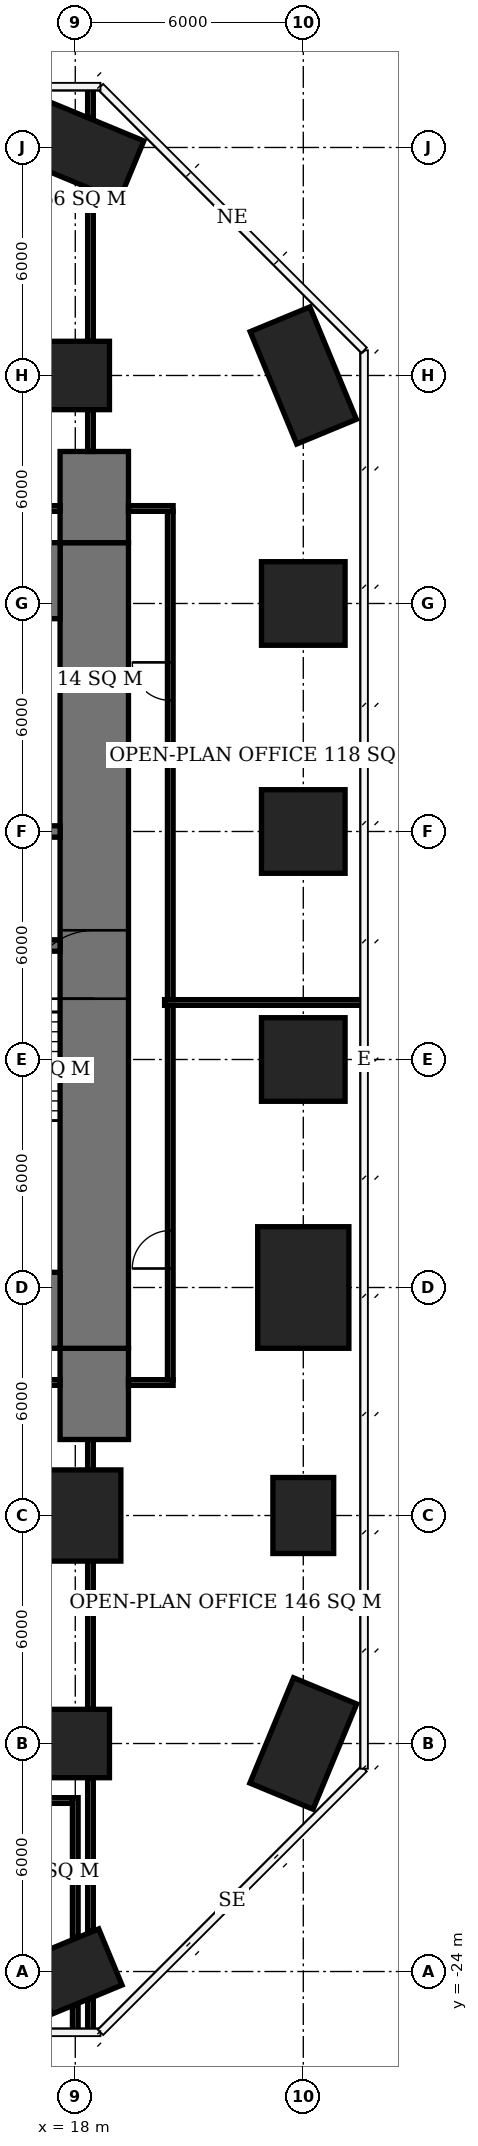
"""IFC4 building model, lengths in metres.
Left out: names, types, materials, properties, quantities, classifications, styles, units other than length and angle.
Written with IfcOpenShell. Run it as: python <this file> out.ifc"""

import sys

from ifc_helpers import new_model, si_unit, direction, frame, frame_2d, origin, origin_2d, place, context, subcontext, project, spatial, rectangle, extrude, element, fill, save


model = new_model("IFC4")
c1 = context("Model", 3, precision=1e-05, world=origin(), true_north=direction((0.0, 1.0)))
c2 = subcontext(c1, "Body", "Model", "MODEL_VIEW")
j1 = project(units=[si_unit("LENGTHUNIT", "METRE"), si_unit("PLANEANGLEUNIT", "RADIAN")], contexts=[c1])
p1 = place(None, origin())
s1 = spatial("IfcSite", under=j1, at=p1, CompositionType="ELEMENT")
p2 = place(p1, origin())
s2 = spatial("IfcBuilding", under=s1, at=p2, CompositionType="ELEMENT")
p3 = place(p2, frame((0.0, 0.0, 37.7)))
s3 = spatial("IfcBuildingStorey", under=s2, at=p3, CompositionType="ELEMENT", Elevation=37.7)
p4 = place(p3, frame((18.0, -24.0, 0.0), z_axis=(0.0, 0.0, 1.0), x_axis=(-0.923879532511, -0.382683432365, 0.0)))
e1 = element("IfcColumn", 1, at=p4, inside=s3, PredefinedType="COLUMN", context=c2, shape_type="SweptSolid", body=[
    extrude(rectangle(XDim=2.0, YDim=1.6, at=origin_2d()), origin(), (0.0, 0.0, 1.0), 3.9),
])
p5 = place(p3, frame((18.0, -18.0, 0.0), z_axis=(0.0, 0.0, 1.0), x_axis=(1.0, 0.0, 0.0)))
e2 = element("IfcColumn", 2, at=p5, inside=s3, PredefinedType="COLUMN", context=c2, shape_type="SweptSolid", body=[
    extrude(rectangle(XDim=1.8, YDim=1.8, at=origin_2d()), origin(), (0.0, 0.0, 1.0), 3.9),
])
p6 = place(p3, frame((18.0, -12.0, 0.0), z_axis=(0.0, 0.0, 1.0), x_axis=(1.0, 0.0, 0.0)))
e3 = element("IfcColumn", 3, at=p6, inside=s3, PredefinedType="COLUMN", context=c2, shape_type="SweptSolid", body=[
    extrude(rectangle(XDim=2.4, YDim=2.4, at=origin_2d()), origin(), (0.0, 0.0, 1.0), 3.9),
])
p7 = place(p3, frame((18.0, 18.0, 0.0), z_axis=(0.0, 0.0, 1.0), x_axis=(1.0, 0.0, 0.0)))
e4 = element("IfcColumn", 4, at=p7, inside=s3, PredefinedType="COLUMN", context=c2, shape_type="SweptSolid", body=[
    extrude(rectangle(XDim=1.8, YDim=1.8, at=origin_2d()), origin(), (0.0, 0.0, 1.0), 3.9),
])
p8 = place(p3, frame((18.0, 24.0, 0.0), z_axis=(0.0, 0.0, 1.0), x_axis=(0.923879532511, -0.382683432365, 0.0)))
e5 = element("IfcColumn", 5, at=p8, inside=s3, PredefinedType="COLUMN", context=c2, shape_type="SweptSolid", body=[
    extrude(rectangle(XDim=3.2, YDim=1.7, at=origin_2d()), origin(), (0.0, 0.0, 1.0), 3.9),
])
p9 = place(p3, frame((24.0, -18.0, 0.0), z_axis=(0.0, 0.0, 1.0), x_axis=(-0.382683432365, -0.923879532511, 0.0)))
e6 = element("IfcColumn", 6, at=p9, inside=s3, PredefinedType="COLUMN", context=c2, shape_type="SweptSolid", body=[
    extrude(rectangle(XDim=3.0, YDim=1.8, at=origin_2d()), origin(), (0.0, 0.0, 1.0), 3.9),
])
p10 = place(p3, frame((24.0, -12.0, 0.0), z_axis=(0.0, 0.0, 1.0), x_axis=(0.0, 1.0, 0.0)))
e7 = element("IfcColumn", 7, at=p10, inside=s3, PredefinedType="COLUMN", context=c2, shape_type="SweptSolid", body=[
    extrude(rectangle(XDim=2.0, YDim=1.6, at=origin_2d()), origin(), (0.0, 0.0, 1.0), 3.9),
])
p11 = place(p3, frame((24.0, -6.0, 0.0), z_axis=(0.0, 0.0, 1.0), x_axis=(0.0, 1.0, 0.0)))
e8 = element("IfcColumn", 8, at=p11, inside=s3, PredefinedType="COLUMN", context=c2, shape_type="SweptSolid", body=[
    extrude(rectangle(XDim=3.2, YDim=2.4, at=origin_2d()), origin(), (0.0, 0.0, 1.0), 3.9),
])
for number, where, z_axis, x_axis in (
    (9, (24.0, 0.0, 0.0), (0.0, 0.0, 1.0), (1.0, 0.0, 0.0)),
    (10, (24.0, 6.0, 0.0), (0.0, 0.0, 1.0), (1.0, 0.0, 0.0)),
    (11, (24.0, 12.0, 0.0), (0.0, 0.0, 1.0), (1.0, 0.0, 0.0)),
):
    element("IfcColumn", number, at=place(p3, frame(where, z_axis=z_axis, x_axis=x_axis)), inside=s3, PredefinedType="COLUMN", context=c2, shape_type="SweptSolid", body=[
        extrude(rectangle(XDim=2.2, YDim=2.2, at=origin_2d()), origin(), (0.0, 0.0, 1.0), 3.9),
    ])
p12 = place(p3, frame((24.0, 18.0, 0.0), z_axis=(0.0, 0.0, 1.0), x_axis=(0.382683432365, -0.923879532511, 0.0)))
e12 = element("IfcColumn", 12, at=p12, inside=s3, PredefinedType="COLUMN", context=c2, shape_type="SweptSolid", body=[
    extrude(rectangle(XDim=3.2, YDim=1.7, at=origin_2d()), origin(), (0.0, 0.0, 1.0), 3.9),
])
for number, where, z_axis, x_axis in (
    (13, (-5.6, -6.6, 0.0), (0.0, 0.0, 1.0), (1.0, 0.0, 0.0)),
    (14, (-5.6, 12.6, 0.0), (0.0, 0.0, 1.0), (1.0, 0.0, 0.0)),
):
    element("IfcWall", number, at=place(p3, frame(where, z_axis=z_axis, x_axis=x_axis)), inside=s3, PredefinedType="SHEAR", context=c2, shape_type="SweptSolid", body=[
        extrude(rectangle(XDim=23.2, YDim=2.0, at=frame_2d((11.6, 0.0))), origin(), (0.0, 0.0, 1.0), 3.9),
    ])
p13 = place(p3, frame((18.5, -7.6, 0.0), z_axis=(0.0, 0.0, 1.0), x_axis=(0.0, 1.0, 0.0)))
e15 = element("IfcWall", 15, at=p13, inside=s3, PredefinedType="SHEAR", context=c2, shape_type="SweptSolid", body=[
    extrude(rectangle(XDim=21.2, YDim=1.8, at=frame_2d((10.6, 0.0))), origin(), (0.0, 0.0, 1.0), 3.9),
])
p14 = place(p13, frame((9.2, 0.0, 0.0)))
e16 = element("IfcOpeningElement", 16, at=p14, cuts=e15, PredefinedType="OPENING", context=c2, shape_type="SweptSolid", body=[
    extrude(rectangle(XDim=1.8, YDim=2.4, at=frame_2d((0.9, 1.2))), frame((0.0, 0.91, 0.0), z_axis=(0.0, -1.0, 0.0), x_axis=(1.0, 0.0, 0.0)), (0.0, 0.0, 1.0), 1.82),
])
for number, where, z_axis, x_axis in (
    (17, (18.5, -10.0, 0.0), (0.0, 0.0, 1.0), (0.0, 1.0, 0.0)),
    (18, (18.5, 13.6, 0.0), (0.0, 0.0, 1.0), (0.0, 1.0, 0.0)),
):
    element("IfcWall", number, at=place(p3, frame(where, z_axis=z_axis, x_axis=x_axis)), inside=s3, PredefinedType="SHEAR", context=c2, shape_type="SweptSolid", body=[
        extrude(rectangle(XDim=2.4, YDim=1.8, at=frame_2d((1.2, 0.0))), origin(), (0.0, 0.0, 1.0), 3.9),
    ])
p15 = place(p3, frame((12.15, 3.0, 0.0), z_axis=(0.0, 0.0, 1.0), x_axis=(1.0, 0.0, 0.0)))
e19 = element("IfcWall", 19, at=p15, inside=s3, PredefinedType="SHEAR", context=c2, shape_type="SweptSolid", body=[
    extrude(rectangle(XDim=5.45, YDim=0.3, at=frame_2d((2.725, 0.0))), origin(), (0.0, 0.0, 1.0), 3.9),
])
p16 = place(p15, frame((3.25, 0.0, 0.0)))
e20 = element("IfcOpeningElement", 20, at=p16, cuts=e19, PredefinedType="OPENING", context=c2, shape_type="SweptSolid", body=[
    extrude(rectangle(XDim=1.2, YDim=2.1, at=frame_2d((0.6, 1.05))), frame((0.0, 0.16, 0.0), z_axis=(0.0, -1.0, 0.0), x_axis=(1.0, 0.0, 0.0)), (0.0, 0.0, 1.0), 0.32),
])
p17 = place(p15, frame((0.45, 0.0, 0.0)))
e21 = element("IfcOpeningElement", 21, at=p17, cuts=e19, PredefinedType="OPENING", context=c2, shape_type="SweptSolid", body=[
    extrude(rectangle(XDim=0.9, YDim=2.1, at=frame_2d((0.45, 1.05))), frame((0.0, 0.16, 0.0), z_axis=(0.0, -1.0, 0.0), x_axis=(1.0, 0.0, 0.0)), (0.0, 0.0, 1.0), 0.32),
])
p18 = place(p3, frame((-0.15, 6.0, 0.0), z_axis=(0.0, 0.0, 1.0), x_axis=(1.0, 0.0, 0.0)))
e22 = element("IfcWall", 22, at=p18, inside=s3, PredefinedType="SHEAR", context=c2, shape_type="SweptSolid", body=[
    extrude(rectangle(XDim=17.75, YDim=0.3, at=frame_2d((8.875, 0.0))), origin(), (0.0, 0.0, 1.0), 3.9),
])
p19 = place(p18, frame((13.15, 0.0, 0.0)))
e23 = element("IfcOpeningElement", 23, at=p19, cuts=e22, PredefinedType="OPENING", context=c2, shape_type="SweptSolid", body=[
    extrude(rectangle(XDim=0.9, YDim=2.1, at=frame_2d((0.45, 1.05))), frame((0.0, 0.16, 0.0), z_axis=(0.0, -1.0, 0.0), x_axis=(1.0, 0.0, 0.0)), (0.0, 0.0, 1.0), 0.32),
])
p20 = place(p18, frame((16.25, 0.0, 0.0)))
e24 = element("IfcOpeningElement", 24, at=p20, cuts=e22, PredefinedType="OPENING", context=c2, shape_type="SweptSolid", body=[
    extrude(rectangle(XDim=1.0, YDim=2.1, at=frame_2d((0.5, 1.05))), frame((0.0, 0.16, 0.0), z_axis=(0.0, -1.0, 0.0), x_axis=(1.0, 0.0, 0.0)), (0.0, 0.0, 1.0), 0.32),
])
p21 = place(p18, frame((1.1, 0.0, 0.0)))
e25 = element("IfcOpeningElement", 25, at=p21, cuts=e22, PredefinedType="OPENING", context=c2, shape_type="SweptSolid", body=[
    extrude(rectangle(XDim=1.1, YDim=2.1, at=frame_2d((0.55, 1.05))), frame((0.0, 0.16, 0.0), z_axis=(0.0, -1.0, 0.0), x_axis=(1.0, 0.0, 0.0)), (0.0, 0.0, 1.0), 0.32),
])
p22 = place(p18, frame((4.1, 0.0, 0.0)))
e26 = element("IfcOpeningElement", 26, at=p22, cuts=e22, PredefinedType="OPENING", context=c2, shape_type="SweptSolid", body=[
    extrude(rectangle(XDim=1.1, YDim=2.1, at=frame_2d((0.55, 1.05))), frame((0.0, 0.16, 0.0), z_axis=(0.0, -1.0, 0.0), x_axis=(1.0, 0.0, 0.0)), (0.0, 0.0, 1.0), 0.32),
])
p23 = place(p18, frame((7.1, 0.0, 0.0)))
e27 = element("IfcOpeningElement", 27, at=p23, cuts=e22, PredefinedType="OPENING", context=c2, shape_type="SweptSolid", body=[
    extrude(rectangle(XDim=1.1, YDim=2.1, at=frame_2d((0.55, 1.05))), frame((0.0, 0.16, 0.0), z_axis=(0.0, -1.0, 0.0), x_axis=(1.0, 0.0, 0.0)), (0.0, 0.0, 1.0), 0.32),
])
p24 = place(p18, frame((10.1, 0.0, 0.0)))
e28 = element("IfcOpeningElement", 28, at=p24, cuts=e22, PredefinedType="OPENING", context=c2, shape_type="SweptSolid", body=[
    extrude(rectangle(XDim=1.1, YDim=2.1, at=frame_2d((0.55, 1.05))), frame((0.0, 0.16, 0.0), z_axis=(0.0, -1.0, 0.0), x_axis=(1.0, 0.0, 0.0)), (0.0, 0.0, 1.0), 0.32),
])
p25 = place(p3, frame((12.075, -19.5, 0.0), z_axis=(0.0, 0.0, 1.0), x_axis=(1.0, 0.0, 0.0)))
e29 = element("IfcWall", 29, at=p25, inside=s3, PredefinedType="PARTITIONING", context=c2, shape_type="SweptSolid", body=[
    extrude(rectangle(XDim=5.85, YDim=0.15, at=frame_2d((2.925, 0.0))), origin(), (0.0, 0.0, 1.0), 3.65),
])
p26 = place(p25, frame((2.425, 0.0, 0.0)))
e30 = element("IfcOpeningElement", 30, at=p26, cuts=e29, PredefinedType="OPENING", context=c2, shape_type="SweptSolid", body=[
    extrude(rectangle(XDim=1.0, YDim=2.1, at=frame_2d((0.5, 1.05))), frame((0.0, 0.085, 0.0), z_axis=(0.0, -1.0, 0.0), x_axis=(1.0, 0.0, 0.0)), (0.0, 0.0, 1.0), 0.17),
])
p27 = place(p3, frame((18.0, -25.6, 0.0), z_axis=(0.0, 0.0, 1.0), x_axis=(0.0, 1.0, 0.0)))
e31 = element("IfcWall", 31, at=p27, inside=s3, PredefinedType="PARTITIONING", context=c2, shape_type="SweptSolid", body=[
    extrude(rectangle(XDim=0.703, YDim=0.15, at=frame_2d((0.352, 0.0))), origin(), (0.0, 0.0, 1.0), 3.65),
])
p28 = place(p3, frame((18.0, -23.103, 0.0), z_axis=(0.0, 0.0, 1.0), x_axis=(0.0, 1.0, 0.0)))
e32 = element("IfcWall", 32, at=p28, inside=s3, PredefinedType="PARTITIONING", context=c2, shape_type="SweptSolid", body=[
    extrude(rectangle(XDim=3.678, YDim=0.15, at=frame_2d((1.839, 0.0))), origin(), (0.0, 0.0, 1.0), 3.65),
])
p29 = place(p3, frame((-5.6, 14.5, 0.0), z_axis=(0.0, 0.0, 1.0), x_axis=(1.0, 0.0, 0.0)))
e33 = element("IfcWall", 33, at=p29, inside=s3, PredefinedType="PARTITIONING", context=c2, shape_type="SweptSolid", body=[
    extrude(rectangle(XDim=23.2, YDim=0.15, at=frame_2d((11.6, 0.0))), origin(), (0.0, 0.0, 1.0), 3.65),
])
p30 = place(p29, frame((14.58, 0.0, 0.0)))
e34 = element("IfcOpeningElement", 34, at=p30, cuts=e33, PredefinedType="OPENING", context=c2, shape_type="SweptSolid", body=[
    extrude(rectangle(XDim=1.0, YDim=2.1, at=frame_2d((0.5, 1.05))), frame((0.0, 0.085, 0.0), z_axis=(0.0, -1.0, 0.0), x_axis=(1.0, 0.0, 0.0)), (0.0, 0.0, 1.0), 0.17),
])
p31 = place(p3, frame((17.6, -8.5, 0.0), z_axis=(0.0, 0.0, 1.0), x_axis=(-1.0, 0.0, 0.0)))
e35 = element("IfcWall", 35, at=p31, inside=s3, PredefinedType="PARTITIONING", context=c2, shape_type="SweptSolid", body=[
    extrude(rectangle(XDim=16.025, YDim=0.15, at=frame_2d((8.013, 0.0))), origin(), (0.0, 0.0, 1.0), 3.65),
])
p32 = place(p31, frame((9.965, 0.0, 0.0)))
e36 = element("IfcOpeningElement", 36, at=p32, cuts=e35, PredefinedType="OPENING", context=c2, shape_type="SweptSolid", body=[
    extrude(rectangle(XDim=1.0, YDim=2.1, at=frame_2d((0.5, 1.05))), frame((0.0, 0.085, 0.0), z_axis=(0.0, -1.0, 0.0), x_axis=(1.0, 0.0, 0.0)), (0.0, 0.0, 1.0), 0.17),
])
p33 = place(p3, frame((18.4, -25.6, 0.0), z_axis=(0.0, 0.0, 1.0), x_axis=(0.0, 1.0, 0.0)))
e37 = element("IfcWall", 37, at=p33, inside=s3, PredefinedType="PARTITIONING", context=c2, shape_type="SweptSolid", body=[
    extrude(rectangle(XDim=0.869, YDim=0.15, at=frame_2d((0.435, 0.0))), origin(), (0.0, 0.0, 1.0), 3.65),
])
p34 = place(p3, frame((18.4, -22.937, 0.0), z_axis=(0.0, 0.0, 1.0), x_axis=(0.0, 1.0, 0.0)))
e38 = element("IfcWall", 38, at=p34, inside=s3, PredefinedType="PARTITIONING", context=c2, shape_type="SweptSolid", body=[
    extrude(rectangle(XDim=4.037, YDim=0.15, at=frame_2d((2.019, 0.0))), origin(), (0.0, 0.0, 1.0), 3.65),
])
p35 = place(p3, frame((18.4, -17.1, 0.0), z_axis=(0.0, 0.0, 1.0), x_axis=(0.0, 1.0, 0.0)))
e39 = element("IfcWall", 39, at=p35, inside=s3, PredefinedType="PARTITIONING", context=c2, shape_type="SweptSolid", body=[
    extrude(rectangle(XDim=3.9, YDim=0.15, at=frame_2d((1.95, 0.0))), origin(), (0.0, 0.0, 1.0), 3.65),
])
p36 = place(p3, frame((18.4, -10.8, 0.0), z_axis=(0.0, 0.0, 1.0), x_axis=(0.0, 1.0, 0.0)))
e40 = element("IfcWall", 40, at=p36, inside=s3, PredefinedType="PARTITIONING", context=c2, shape_type="SweptSolid", body=[
    extrude(rectangle(XDim=0.8, YDim=0.15, at=frame_2d((0.4, 0.0))), origin(), (0.0, 0.0, 1.0), 3.65),
])
p37 = place(p3, frame((18.4, 16.0, 0.0), z_axis=(0.0, 0.0, 1.0), x_axis=(0.0, 1.0, 0.0)))
e41 = element("IfcWall", 41, at=p37, inside=s3, PredefinedType="PARTITIONING", context=c2, shape_type="SweptSolid", body=[
    extrude(rectangle(XDim=1.1, YDim=0.15, at=frame_2d((0.55, 0.0))), origin(), (0.0, 0.0, 1.0), 3.65),
])
p38 = place(p3, frame((18.4, 18.9, 0.0), z_axis=(0.0, 0.0, 1.0), x_axis=(0.0, 1.0, 0.0)))
e42 = element("IfcWall", 42, at=p38, inside=s3, PredefinedType="PARTITIONING", context=c2, shape_type="SweptSolid", body=[
    extrude(rectangle(XDim=3.983, YDim=0.15, at=frame_2d((1.992, 0.0))), origin(), (0.0, 0.0, 1.0), 3.65),
])
p39 = place(p3, frame((18.4, 24.785, 0.0), z_axis=(0.0, 0.0, 1.0), x_axis=(0.0, 1.0, 0.0)))
e43 = element("IfcWall", 43, at=p39, inside=s3, PredefinedType="PARTITIONING", context=c2, shape_type="SweptSolid", body=[
    extrude(rectangle(XDim=0.815, YDim=0.15, at=frame_2d((0.407, 0.0))), origin(), (0.0, 0.0, 1.0), 3.65),
])
for number, where, z_axis, x_axis in (
    (44, (19.4, -8.5, 0.0), (0.0, 0.0, 1.0), (1.0, 0.0, 0.0)),
    (45, (19.4, 14.5, 0.0), (0.0, 0.0, 1.0), (1.0, 0.0, 0.0)),
):
    element("IfcWall", number, at=place(p3, frame(where, z_axis=z_axis, x_axis=x_axis)), inside=s3, PredefinedType="PARTITIONING", context=c2, shape_type="SweptSolid", body=[
        extrude(rectangle(XDim=1.175, YDim=0.15, at=frame_2d((0.587, 0.0))), origin(), (0.0, 0.0, 1.0), 3.65),
    ])
p40 = place(p3, frame((20.5, -8.425, 0.0), z_axis=(0.0, 0.0, 1.0), x_axis=(0.0, 1.0, 0.0)))
e46 = element("IfcWall", 46, at=p40, inside=s3, PredefinedType="PARTITIONING", context=c2, shape_type="SweptSolid", body=[
    extrude(rectangle(XDim=9.85, YDim=0.15, at=frame_2d((4.925, 0.0))), origin(), (0.0, 0.0, 1.0), 3.65),
])
p41 = place(p40, frame((2.925, 0.0, 0.0)))
e47 = element("IfcOpeningElement", 47, at=p41, cuts=e46, PredefinedType="OPENING", context=c2, shape_type="SweptSolid", body=[
    extrude(rectangle(XDim=1.0, YDim=2.1, at=frame_2d((0.5, 1.05))), frame((0.0, 0.085, 0.0), z_axis=(0.0, -1.0, 0.0), x_axis=(1.0, 0.0, 0.0)), (0.0, 0.0, 1.0), 0.17),
])
p42 = place(p3, frame((20.5, 1.575, 0.0), z_axis=(0.0, 0.0, 1.0), x_axis=(0.0, 1.0, 0.0)))
e48 = element("IfcWall", 48, at=p42, inside=s3, PredefinedType="PARTITIONING", context=c2, shape_type="SweptSolid", body=[
    extrude(rectangle(XDim=12.85, YDim=0.15, at=frame_2d((6.425, 0.0))), origin(), (0.0, 0.0, 1.0), 3.65),
])
p43 = place(p42, frame((7.875, 0.0, 0.0)))
e49 = element("IfcOpeningElement", 49, at=p43, cuts=e48, PredefinedType="OPENING", context=c2, shape_type="SweptSolid", body=[
    extrude(rectangle(XDim=1.0, YDim=2.1, at=frame_2d((0.5, 1.05))), frame((0.0, 0.085, 0.0), z_axis=(0.0, -1.0, 0.0), x_axis=(1.0, 0.0, 0.0)), (0.0, 0.0, 1.0), 0.17),
])
p44 = place(p3, frame((20.35, 1.5, 0.0), z_axis=(0.0, 0.0, 1.0), x_axis=(1.0, 0.0, 0.0)))
e50 = element("IfcWall", 50, at=p44, inside=s3, PredefinedType="PARTITIONING", context=c2, shape_type="SweptSolid", body=[
    extrude(rectangle(XDim=5.25, YDim=0.15, at=frame_2d((2.625, 0.0))), origin(), (0.0, 0.0, 1.0), 3.65),
])
p45 = place(p14, origin())
e51 = element("IfcDoor", 51, at=p45, inside=s3, OperationType="DOUBLE_DOOR_SINGLE_SWING", PredefinedType="DOOR", context=c2, shape_type="SweptSolid", body=[
    extrude(rectangle(XDim=1.8, YDim=2.4, at=frame_2d((0.9, 1.2))), frame((0.0, 0.025, 0.0), z_axis=(0.0, -1.0, 0.0), x_axis=(1.0, 0.0, 0.0)), (0.0, 0.0, 1.0), 0.05),
])
fill(e16, e51)
p46 = place(p41, origin())
e52 = element("IfcDoor", 52, at=p46, inside=s3, OperationType="SINGLE_SWING_LEFT", PredefinedType="DOOR", context=c2, shape_type="SweptSolid", body=[
    extrude(rectangle(XDim=1.0, YDim=2.1, at=frame_2d((0.5, 1.05))), frame((0.0, 0.025, 0.0), z_axis=(0.0, -1.0, 0.0), x_axis=(1.0, 0.0, 0.0)), (0.0, 0.0, 1.0), 0.05),
])
fill(e47, e52)
p47 = place(p43, origin())
e53 = element("IfcDoor", 53, at=p47, inside=s3, OperationType="SINGLE_SWING_RIGHT", PredefinedType="DOOR", context=c2, shape_type="SweptSolid", body=[
    extrude(rectangle(XDim=1.0, YDim=2.1, at=frame_2d((0.5, 1.05))), frame((0.0, 0.025, 0.0), z_axis=(0.0, -1.0, 0.0), x_axis=(1.0, 0.0, 0.0)), (0.0, 0.0, 1.0), 0.05),
])
fill(e49, e53)
save(model, sys.argv[1])
